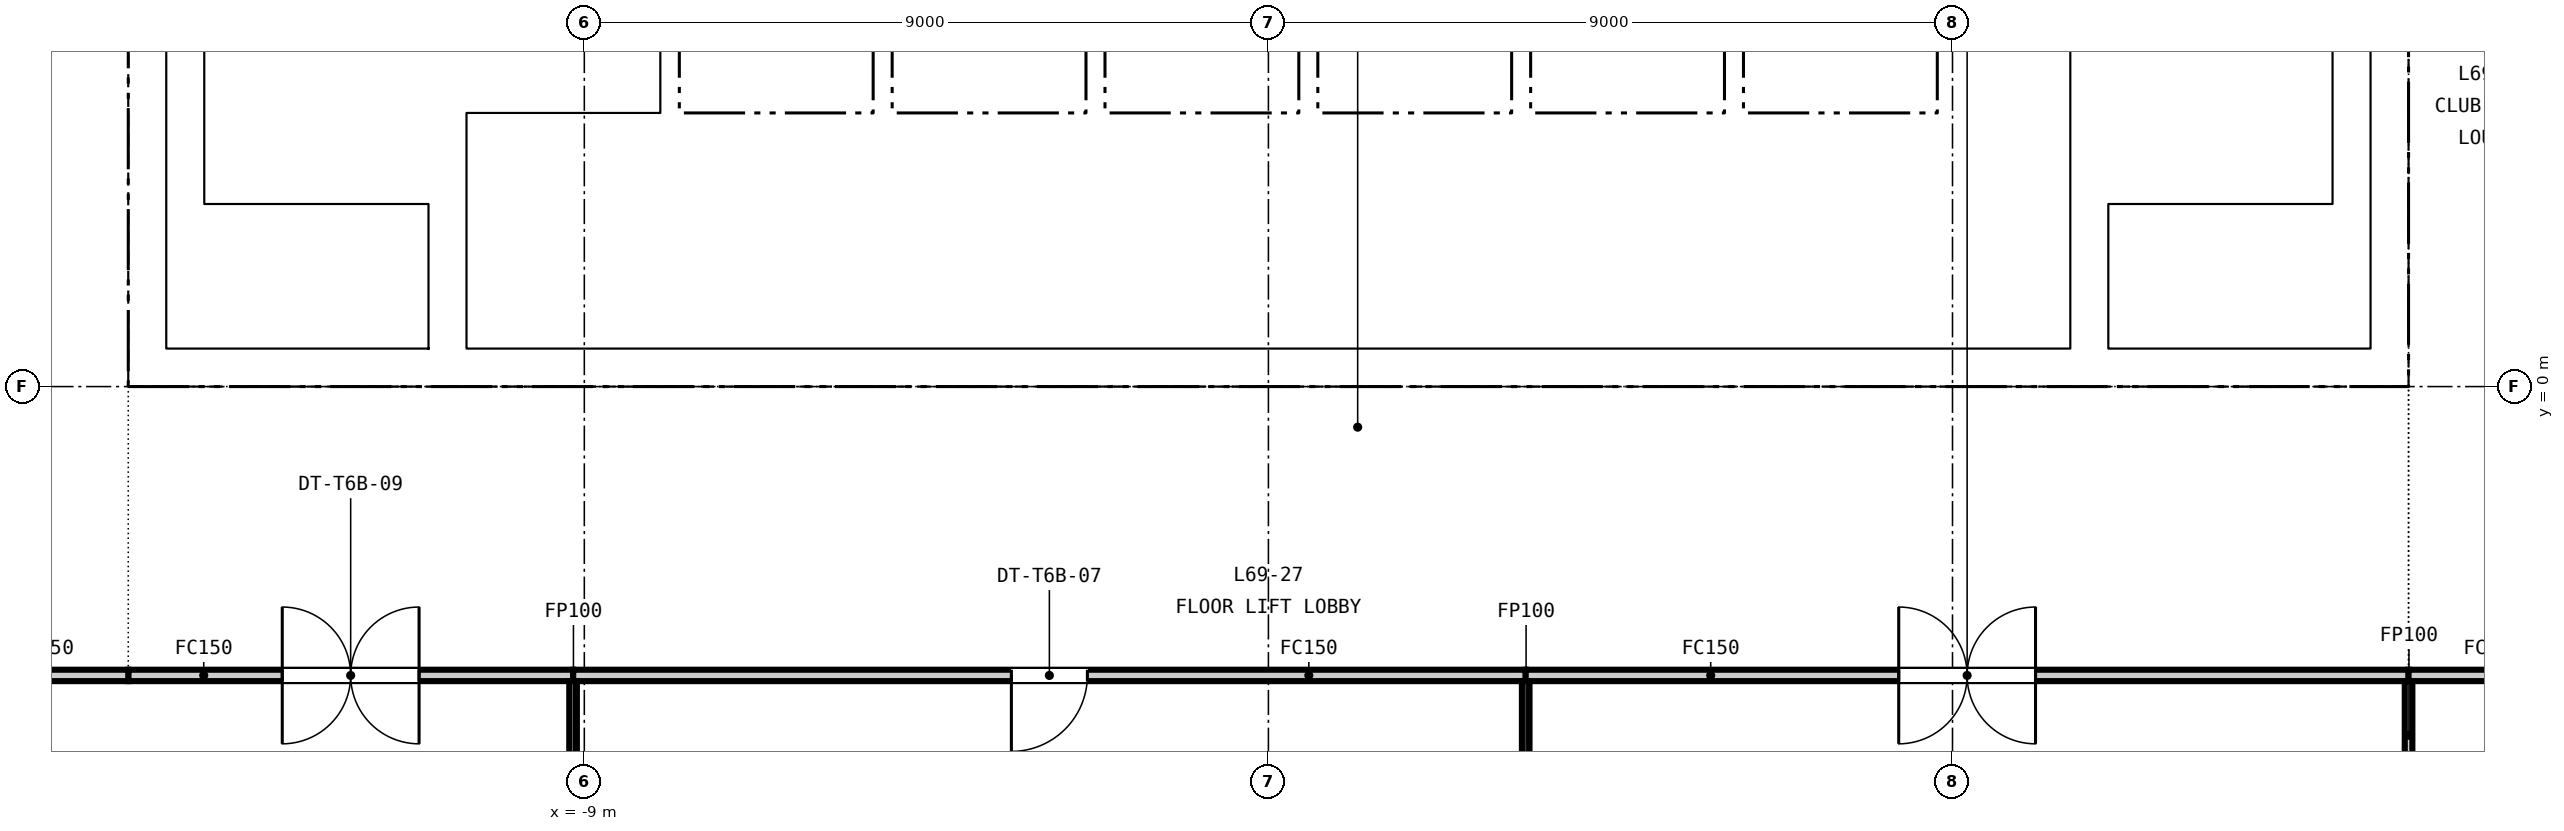
"""IFC4 building model, lengths in metres.
Left out: names, types, materials, properties, quantities, classifications, styles, units other than length and angle.
Written with IfcOpenShell. Run it as: python <this file> out.ifc"""

import sys

from ifc_helpers import new_model, si_unit, direction, frame, frame_2d, origin, place, context, subcontext, project, spatial, rectangle, extrude, element, fill, save


model = new_model("IFC4")
c1 = context("Model", 3, precision=1e-05, world=origin(), true_north=direction((0.0, 1.0)))
c2 = subcontext(c1, "Body", "Model", "MODEL_VIEW")
j1 = project(units=[si_unit("LENGTHUNIT", "METRE"), si_unit("PLANEANGLEUNIT", "RADIAN")], contexts=[c1])
p1 = place(None, origin())
s1 = spatial("IfcSite", under=j1, at=p1, CompositionType="ELEMENT")
p2 = place(p1, origin())
s2 = spatial("IfcBuilding", under=s1, at=p2, CompositionType="ELEMENT")
p3 = place(p2, frame((0.0, 0.0, 271.9)))
s3 = spatial("IfcBuildingStorey", under=s2, at=p3, CompositionType="ELEMENT", Elevation=271.9)
p4 = place(p3, frame((-15.0, 0.25, -0.15), z_axis=(0.0, 0.0, 1.0), x_axis=(1.0, 0.0, 0.0)))
e1 = element("IfcWall", 1, at=p4, inside=s3, PredefinedType="SOLIDWALL", context=c2, shape_type="SweptSolid", body=[
    extrude(rectangle(XDim=30.0, YDim=0.5, at=frame_2d((15.0, 0.0))), origin(), (0.0, 0.0, 1.0), 3.65),
])
p5 = place(p4, frame((5.8, 0.0, 0.15)))
e2 = element("IfcOpeningElement", 2, at=p5, cuts=e1, PredefinedType="OPENING", context=c2, shape_type="SweptSolid", body=[
    extrude(rectangle(XDim=2.4, YDim=2.4, at=frame_2d((1.2, 1.2))), frame((0.0, 0.26, 0.0), z_axis=(0.0, -1.0, 0.0), x_axis=(1.0, 0.0, 0.0)), (0.0, 0.0, 1.0), 0.52),
])
p6 = place(p4, frame((13.8, 0.0, 0.15)))
e3 = element("IfcOpeningElement", 3, at=p6, cuts=e1, PredefinedType="OPENING", context=c2, shape_type="SweptSolid", body=[
    extrude(rectangle(XDim=2.4, YDim=2.4, at=frame_2d((1.2, 1.2))), frame((0.0, 0.26, 0.0), z_axis=(0.0, -1.0, 0.0), x_axis=(1.0, 0.0, 0.0)), (0.0, 0.0, 1.0), 0.52),
])
p7 = place(p4, frame((21.8, 0.0, 0.15)))
e4 = element("IfcOpeningElement", 4, at=p7, cuts=e1, PredefinedType="OPENING", context=c2, shape_type="SweptSolid", body=[
    extrude(rectangle(XDim=2.4, YDim=2.4, at=frame_2d((1.2, 1.2))), frame((0.0, 0.26, 0.0), z_axis=(0.0, -1.0, 0.0), x_axis=(1.0, 0.0, 0.0)), (0.0, 0.0, 1.0), 0.52),
])
p8 = place(p4, frame((1.5, 0.0, 0.15)))
e5 = element("IfcOpeningElement", 5, at=p8, cuts=e1, PredefinedType="OPENING", context=c2, shape_type="SweptSolid", body=[
    extrude(rectangle(XDim=1.2, YDim=2.1, at=frame_2d((0.6, 1.05))), frame((0.0, 0.26, 0.0), z_axis=(0.0, -1.0, 0.0), x_axis=(1.0, 0.0, 0.0)), (0.0, 0.0, 1.0), 0.52),
])
p9 = place(p4, frame((27.3, 0.0, 0.15)))
e6 = element("IfcOpeningElement", 6, at=p9, cuts=e1, PredefinedType="OPENING", context=c2, shape_type="SweptSolid", body=[
    extrude(rectangle(XDim=1.2, YDim=2.1, at=frame_2d((0.6, 1.05))), frame((0.0, 0.26, 0.0), z_axis=(0.0, -1.0, 0.0), x_axis=(1.0, 0.0, 0.0)), (0.0, 0.0, 1.0), 0.52),
])
for number, where, z_axis, x_axis in (
    (7, (-14.75, 0.5, -0.15), (0.0, 0.0, 1.0), (0.0, 1.0, 0.0)),
    (8, (14.75, 0.5, -0.15), (0.0, 0.0, 1.0), (0.0, 1.0, 0.0)),
    (9, (-10.8, 0.5, -0.15), (0.0, 0.0, 1.0), (0.0, 1.0, 0.0)),
    (10, (10.8, 0.5, -0.15), (0.0, 0.0, 1.0), (0.0, 1.0, 0.0)),
):
    element("IfcWall", number, at=place(p3, frame(where, z_axis=z_axis, x_axis=x_axis)), inside=s3, PredefinedType="SOLIDWALL", context=c2, shape_type="SweptSolid", body=[
        extrude(rectangle(XDim=14.0, YDim=0.5, at=frame_2d((7.0, 0.0))), origin(), (0.0, 0.0, 1.0), 3.65),
    ])
p10 = place(p3, frame((-10.55, 3.5, 0.0), z_axis=(0.0, 0.0, 1.0), x_axis=(1.0, 0.0, 0.0)))
e11 = element("IfcWall", 11, at=p10, inside=s3, PredefinedType="PARTITIONING", context=c2, shape_type="SweptSolid", body=[
    extrude(rectangle(XDim=21.1, YDim=0.2, at=frame_2d((10.55, 0.0))), origin(), (0.0, 0.0, 1.0), 3.5),
])
p11 = place(p10, frame((0.675, 0.0, 0.0)))
e12 = element("IfcOpeningElement", 12, at=p11, cuts=e11, PredefinedType="OPENING", context=c2, shape_type="SweptSolid", body=[
    extrude(rectangle(XDim=1.2, YDim=2.1, at=frame_2d((0.6, 1.05))), frame((0.0, 0.11, 0.0), z_axis=(0.0, -1.0, 0.0), x_axis=(1.0, 0.0, 0.0)), (0.0, 0.0, 1.0), 0.22),
])
p12 = place(p10, frame((3.475, 0.0, 0.0)))
e13 = element("IfcOpeningElement", 13, at=p12, cuts=e11, PredefinedType="OPENING", context=c2, shape_type="SweptSolid", body=[
    extrude(rectangle(XDim=1.2, YDim=2.1, at=frame_2d((0.6, 1.05))), frame((0.0, 0.11, 0.0), z_axis=(0.0, -1.0, 0.0), x_axis=(1.0, 0.0, 0.0)), (0.0, 0.0, 1.0), 0.22),
])
p13 = place(p10, frame((6.275, 0.0, 0.0)))
e14 = element("IfcOpeningElement", 14, at=p13, cuts=e11, PredefinedType="OPENING", context=c2, shape_type="SweptSolid", body=[
    extrude(rectangle(XDim=1.2, YDim=2.1, at=frame_2d((0.6, 1.05))), frame((0.0, 0.11, 0.0), z_axis=(0.0, -1.0, 0.0), x_axis=(1.0, 0.0, 0.0)), (0.0, 0.0, 1.0), 0.22),
])
p14 = place(p10, frame((9.075, 0.0, 0.0)))
e15 = element("IfcOpeningElement", 15, at=p14, cuts=e11, PredefinedType="OPENING", context=c2, shape_type="SweptSolid", body=[
    extrude(rectangle(XDim=1.2, YDim=2.1, at=frame_2d((0.6, 1.05))), frame((0.0, 0.11, 0.0), z_axis=(0.0, -1.0, 0.0), x_axis=(1.0, 0.0, 0.0)), (0.0, 0.0, 1.0), 0.22),
])
p15 = place(p10, frame((11.875, 0.0, 0.0)))
e16 = element("IfcOpeningElement", 16, at=p15, cuts=e11, PredefinedType="OPENING", context=c2, shape_type="SweptSolid", body=[
    extrude(rectangle(XDim=1.2, YDim=2.1, at=frame_2d((0.6, 1.05))), frame((0.0, 0.11, 0.0), z_axis=(0.0, -1.0, 0.0), x_axis=(1.0, 0.0, 0.0)), (0.0, 0.0, 1.0), 0.22),
])
p16 = place(p10, frame((14.675, 0.0, 0.0)))
e17 = element("IfcOpeningElement", 17, at=p16, cuts=e11, PredefinedType="OPENING", context=c2, shape_type="SweptSolid", body=[
    extrude(rectangle(XDim=1.2, YDim=2.1, at=frame_2d((0.6, 1.05))), frame((0.0, 0.11, 0.0), z_axis=(0.0, -1.0, 0.0), x_axis=(1.0, 0.0, 0.0)), (0.0, 0.0, 1.0), 0.22),
])
p17 = place(p10, frame((17.475, 0.0, 0.0)))
e18 = element("IfcOpeningElement", 18, at=p17, cuts=e11, PredefinedType="OPENING", context=c2, shape_type="SweptSolid", body=[
    extrude(rectangle(XDim=1.2, YDim=2.1, at=frame_2d((0.6, 1.05))), frame((0.0, 0.11, 0.0), z_axis=(0.0, -1.0, 0.0), x_axis=(1.0, 0.0, 0.0)), (0.0, 0.0, 1.0), 0.22),
])
p18 = place(p10, frame((19.9, 0.0, 0.0)))
e19 = element("IfcOpeningElement", 19, at=p18, cuts=e11, PredefinedType="OPENING", context=c2, shape_type="SweptSolid", body=[
    extrude(rectangle(XDim=0.9, YDim=2.1, at=frame_2d((0.45, 1.05))), frame((0.0, 0.11, 0.0), z_axis=(0.0, -1.0, 0.0), x_axis=(1.0, 0.0, 0.0)), (0.0, 0.0, 1.0), 0.22),
])
for number, where, z_axis, x_axis in (
    (20, (-7.875, 3.6, 0.0), (0.0, 0.0, 1.0), (0.0, 1.0, 0.0)),
    (21, (-5.075, 3.6, 0.0), (0.0, 0.0, 1.0), (0.0, 1.0, 0.0)),
    (22, (-2.275, 3.6, 0.0), (0.0, 0.0, 1.0), (0.0, 1.0, 0.0)),
    (23, (0.525, 3.6, 0.0), (0.0, 0.0, 1.0), (0.0, 1.0, 0.0)),
    (24, (3.325, 3.6, 0.0), (0.0, 0.0, 1.0), (0.0, 1.0, 0.0)),
    (25, (6.125, 3.6, 0.0), (0.0, 0.0, 1.0), (0.0, 1.0, 0.0)),
    (26, (8.925, 3.6, 0.0), (0.0, 0.0, 1.0), (0.0, 1.0, 0.0)),
):
    element("IfcWall", number, at=place(p3, frame(where, z_axis=z_axis, x_axis=x_axis)), inside=s3, PredefinedType="PARTITIONING", context=c2, shape_type="SweptSolid", body=[
        extrude(rectangle(XDim=2.3, YDim=0.25, at=frame_2d((1.15, 0.0))), origin(), (0.0, 0.0, 1.0), 3.5),
    ])
for number, where, z_axis, x_axis in (
    (27, (-14.25, 0.5, 0.0), (0.0, 0.0, 1.0), (0.0, 1.0, 0.0)),
    (28, (14.25, 0.5, 0.0), (0.0, 0.0, 1.0), (0.0, 1.0, 0.0)),
):
    element("IfcWall", number, at=place(p3, frame(where, z_axis=z_axis, x_axis=x_axis)), inside=s3, PredefinedType="SOLIDWALL", context=c2, shape_type="SweptSolid", body=[
        extrude(rectangle(XDim=14.0, YDim=0.5, at=frame_2d((7.0, 0.0))), origin(), (0.0, 0.0, 1.0), 3.5),
    ])
p19 = place(p3, frame((3.385, -3.8, 0.0), z_axis=(0.0, 0.0, 1.0), x_axis=(-1.0, 0.0, 0.0)))
e29 = element("IfcWall", 29, at=p19, inside=s3, PredefinedType="PARTITIONING", context=c2, shape_type="SweptSolid", body=[
    extrude(rectangle(XDim=12.533, YDim=0.15, at=frame_2d((6.267, 0.0))), origin(), (0.0, 0.0, 1.0), 2.751),
])
p20 = place(p19, frame((5.767, 0.0, 0.0)))
e30 = element("IfcOpeningElement", 30, at=p20, cuts=e29, PredefinedType="OPENING", context=c2, shape_type="SweptSolid", body=[
    extrude(rectangle(XDim=1.0, YDim=2.1, at=frame_2d((0.5, 1.05))), frame((0.0, 0.085, 0.0), z_axis=(0.0, -1.0, 0.0), x_axis=(1.0, 0.0, 0.0)), (0.0, 0.0, 1.0), 0.17),
])
p21 = place(p3, frame((-9.148, -3.8, 0.0), z_axis=(0.0, 0.0, 1.0), x_axis=(-1.0, 0.0, 0.0)))
e31 = element("IfcWall", 31, at=p21, inside=s3, PredefinedType="PARTITIONING", context=c2, shape_type="SweptSolid", body=[
    extrude(rectangle(XDim=5.852, YDim=0.15, at=frame_2d((2.926, 0.0))), origin(), (0.0, 0.0, 1.0), 2.751),
])
p22 = place(p21, frame((2.026, 0.0, 0.0)))
e32 = element("IfcOpeningElement", 32, at=p22, cuts=e31, PredefinedType="OPENING", context=c2, shape_type="SweptSolid", body=[
    extrude(rectangle(XDim=1.8, YDim=2.1, at=frame_2d((0.9, 1.05))), frame((0.0, 0.085, 0.0), z_axis=(0.0, -1.0, 0.0), x_axis=(1.0, 0.0, 0.0)), (0.0, 0.0, 1.0), 0.17),
])
p23 = place(p3, frame((15.0, -3.8, 0.0), z_axis=(0.0, 0.0, 1.0), x_axis=(-1.0, 0.0, 0.0)))
e33 = element("IfcWall", 33, at=p23, inside=s3, PredefinedType="PARTITIONING", context=c2, shape_type="SweptSolid", body=[
    extrude(rectangle(XDim=11.615, YDim=0.15, at=frame_2d((5.808, 0.0))), origin(), (0.0, 0.0, 1.0), 2.751),
])
p24 = place(p23, frame((4.907, 0.0, 0.0)))
e34 = element("IfcOpeningElement", 34, at=p24, cuts=e33, PredefinedType="OPENING", context=c2, shape_type="SweptSolid", body=[
    extrude(rectangle(XDim=1.8, YDim=2.1, at=frame_2d((0.9, 1.05))), frame((0.0, 0.085, 0.0), z_axis=(0.0, -1.0, 0.0), x_axis=(1.0, 0.0, 0.0)), (0.0, 0.0, 1.0), 0.17),
])
for number, where, z_axis, x_axis in (
    (35, (-15.0, -3.8, 0.0), (0.0, 0.0, 1.0), (-1.0, 0.0, 0.0)),
    (36, (17.2, -3.8, 0.0), (0.0, 0.0, 1.0), (-1.0, 0.0, 0.0)),
):
    element("IfcWall", number, at=place(p3, frame(where, z_axis=z_axis, x_axis=x_axis)), inside=s3, PredefinedType="PARTITIONING", context=c2, shape_type="SweptSolid", body=[
        extrude(rectangle(XDim=2.2, YDim=0.15, at=frame_2d((1.1, 0.0))), origin(), (0.0, 0.0, 1.0), 2.751),
    ])
for number, where, z_axis, x_axis in (
    (37, (3.385, -8.85, 0.0), (0.0, 0.0, 1.0), (0.0, 1.0, 0.0)),
    (38, (-9.148, -8.85, 0.0), (0.0, 0.0, 1.0), (0.0, 1.0, 0.0)),
):
    element("IfcWall", number, at=place(p3, frame(where, z_axis=z_axis, x_axis=x_axis)), inside=s3, PredefinedType="PARTITIONING", context=c2, shape_type="SweptSolid", body=[
        extrude(rectangle(XDim=4.975, YDim=0.1, at=frame_2d((2.488, 0.0))), origin(), (0.0, 0.0, 1.0), 2.751),
    ])
p25 = place(p3, frame((15.0, -5.3, 0.0), z_axis=(0.0, 0.0, 1.0), x_axis=(0.0, 1.0, 0.0)))
e39 = element("IfcWall", 39, at=p25, inside=s3, PredefinedType="PARTITIONING", context=c2, shape_type="SweptSolid", body=[
    extrude(rectangle(XDim=1.425, YDim=0.1, at=frame_2d((0.712, 0.0))), origin(), (0.0, 0.0, 1.0), 2.751),
])
p26 = place(p11, origin())
e40 = element("IfcDoor", 40, at=p26, inside=s3, OperationType="DOUBLE_DOOR_SLIDING", PredefinedType="DOOR", context=c2, shape_type="SweptSolid", body=[
    extrude(rectangle(XDim=1.2, YDim=2.1, at=frame_2d((0.6, 1.05))), frame((0.0, 0.025, 0.0), z_axis=(0.0, -1.0, 0.0), x_axis=(1.0, 0.0, 0.0)), (0.0, 0.0, 1.0), 0.05),
])
fill(e12, e40)
p27 = place(p12, origin())
e41 = element("IfcDoor", 41, at=p27, inside=s3, OperationType="DOUBLE_DOOR_SLIDING", PredefinedType="DOOR", context=c2, shape_type="SweptSolid", body=[
    extrude(rectangle(XDim=1.2, YDim=2.1, at=frame_2d((0.6, 1.05))), frame((0.0, 0.025, 0.0), z_axis=(0.0, -1.0, 0.0), x_axis=(1.0, 0.0, 0.0)), (0.0, 0.0, 1.0), 0.05),
])
fill(e13, e41)
p28 = place(p13, origin())
e42 = element("IfcDoor", 42, at=p28, inside=s3, OperationType="DOUBLE_DOOR_SLIDING", PredefinedType="DOOR", context=c2, shape_type="SweptSolid", body=[
    extrude(rectangle(XDim=1.2, YDim=2.1, at=frame_2d((0.6, 1.05))), frame((0.0, 0.025, 0.0), z_axis=(0.0, -1.0, 0.0), x_axis=(1.0, 0.0, 0.0)), (0.0, 0.0, 1.0), 0.05),
])
fill(e14, e42)
p29 = place(p14, origin())
e43 = element("IfcDoor", 43, at=p29, inside=s3, OperationType="DOUBLE_DOOR_SLIDING", PredefinedType="DOOR", context=c2, shape_type="SweptSolid", body=[
    extrude(rectangle(XDim=1.2, YDim=2.1, at=frame_2d((0.6, 1.05))), frame((0.0, 0.025, 0.0), z_axis=(0.0, -1.0, 0.0), x_axis=(1.0, 0.0, 0.0)), (0.0, 0.0, 1.0), 0.05),
])
fill(e15, e43)
p30 = place(p15, origin())
e44 = element("IfcDoor", 44, at=p30, inside=s3, OperationType="DOUBLE_DOOR_SLIDING", PredefinedType="DOOR", context=c2, shape_type="SweptSolid", body=[
    extrude(rectangle(XDim=1.2, YDim=2.1, at=frame_2d((0.6, 1.05))), frame((0.0, 0.025, 0.0), z_axis=(0.0, -1.0, 0.0), x_axis=(1.0, 0.0, 0.0)), (0.0, 0.0, 1.0), 0.05),
])
fill(e16, e44)
p31 = place(p16, origin())
e45 = element("IfcDoor", 45, at=p31, inside=s3, OperationType="DOUBLE_DOOR_SLIDING", PredefinedType="DOOR", context=c2, shape_type="SweptSolid", body=[
    extrude(rectangle(XDim=1.2, YDim=2.1, at=frame_2d((0.6, 1.05))), frame((0.0, 0.025, 0.0), z_axis=(0.0, -1.0, 0.0), x_axis=(1.0, 0.0, 0.0)), (0.0, 0.0, 1.0), 0.05),
])
fill(e17, e45)
p32 = place(p17, origin())
e46 = element("IfcDoor", 46, at=p32, inside=s3, OperationType="DOUBLE_DOOR_SLIDING", PredefinedType="DOOR", context=c2, shape_type="SweptSolid", body=[
    extrude(rectangle(XDim=1.2, YDim=2.1, at=frame_2d((0.6, 1.05))), frame((0.0, 0.025, 0.0), z_axis=(0.0, -1.0, 0.0), x_axis=(1.0, 0.0, 0.0)), (0.0, 0.0, 1.0), 0.05),
])
fill(e18, e46)
p33 = place(p18, origin())
e47 = element("IfcDoor", 47, at=p33, inside=s3, OperationType="SINGLE_SWING_RIGHT", PredefinedType="DOOR", context=c2, shape_type="SweptSolid", body=[
    extrude(rectangle(XDim=0.9, YDim=2.1, at=frame_2d((0.45, 1.05))), frame((0.0, 0.025, 0.0), z_axis=(0.0, -1.0, 0.0), x_axis=(1.0, 0.0, 0.0)), (0.0, 0.0, 1.0), 0.05),
])
fill(e19, e47)
p34 = place(p5, origin())
e48 = element("IfcDoor", 48, at=p34, inside=s3, OperationType="DOUBLE_DOOR_DOUBLE_SWING", PredefinedType="DOOR", context=c2, shape_type="SweptSolid", body=[
    extrude(rectangle(XDim=2.4, YDim=2.4, at=frame_2d((1.2, 1.2))), frame((0.0, 0.025, 0.0), z_axis=(0.0, -1.0, 0.0), x_axis=(1.0, 0.0, 0.0)), (0.0, 0.0, 1.0), 0.05),
])
fill(e2, e48)
p35 = place(p6, origin())
e49 = element("IfcDoor", 49, at=p35, inside=s3, OperationType="DOUBLE_DOOR_DOUBLE_SWING", PredefinedType="DOOR", context=c2, shape_type="SweptSolid", body=[
    extrude(rectangle(XDim=2.4, YDim=2.4, at=frame_2d((1.2, 1.2))), frame((0.0, 0.025, 0.0), z_axis=(0.0, -1.0, 0.0), x_axis=(1.0, 0.0, 0.0)), (0.0, 0.0, 1.0), 0.05),
])
fill(e3, e49)
p36 = place(p7, origin())
e50 = element("IfcDoor", 50, at=p36, inside=s3, OperationType="DOUBLE_DOOR_DOUBLE_SWING", PredefinedType="DOOR", context=c2, shape_type="SweptSolid", body=[
    extrude(rectangle(XDim=2.4, YDim=2.4, at=frame_2d((1.2, 1.2))), frame((0.0, 0.025, 0.0), z_axis=(0.0, -1.0, 0.0), x_axis=(1.0, 0.0, 0.0)), (0.0, 0.0, 1.0), 0.05),
])
fill(e4, e50)
p37 = place(p8, origin())
e51 = element("IfcDoor", 51, at=p37, inside=s3, OperationType="SINGLE_SWING_LEFT", PredefinedType="DOOR", context=c2, shape_type="SweptSolid", body=[
    extrude(rectangle(XDim=1.2, YDim=2.1, at=frame_2d((0.6, 1.05))), frame((0.0, 0.025, 0.0), z_axis=(0.0, -1.0, 0.0), x_axis=(1.0, 0.0, 0.0)), (0.0, 0.0, 1.0), 0.05),
])
fill(e5, e51)
p38 = place(p9, origin())
e52 = element("IfcDoor", 52, at=p38, inside=s3, OperationType="SINGLE_SWING_RIGHT", PredefinedType="DOOR", context=c2, shape_type="SweptSolid", body=[
    extrude(rectangle(XDim=1.2, YDim=2.1, at=frame_2d((0.6, 1.05))), frame((0.0, 0.025, 0.0), z_axis=(0.0, -1.0, 0.0), x_axis=(1.0, 0.0, 0.0)), (0.0, 0.0, 1.0), 0.05),
])
fill(e6, e52)
p39 = place(p20, origin())
e53 = element("IfcDoor", 53, at=p39, inside=s3, OperationType="SINGLE_SWING_RIGHT", PredefinedType="DOOR", context=c2, shape_type="SweptSolid", body=[
    extrude(rectangle(XDim=1.0, YDim=2.1, at=frame_2d((0.5, 1.05))), frame((0.0, 0.025, 0.0), z_axis=(0.0, -1.0, 0.0), x_axis=(1.0, 0.0, 0.0)), (0.0, 0.0, 1.0), 0.05),
])
fill(e30, e53)
p40 = place(p22, origin())
e54 = element("IfcDoor", 54, at=p40, inside=s3, OperationType="DOUBLE_DOOR_DOUBLE_SWING", PredefinedType="DOOR", context=c2, shape_type="SweptSolid", body=[
    extrude(rectangle(XDim=1.8, YDim=2.1, at=frame_2d((0.9, 1.05))), frame((0.0, 0.025, 0.0), z_axis=(0.0, -1.0, 0.0), x_axis=(1.0, 0.0, 0.0)), (0.0, 0.0, 1.0), 0.05),
])
fill(e32, e54)
p41 = place(p24, origin())
e55 = element("IfcDoor", 55, at=p41, inside=s3, OperationType="DOUBLE_DOOR_DOUBLE_SWING", PredefinedType="DOOR", context=c2, shape_type="SweptSolid", body=[
    extrude(rectangle(XDim=1.8, YDim=2.1, at=frame_2d((0.9, 1.05))), frame((0.0, 0.025, 0.0), z_axis=(0.0, -1.0, 0.0), x_axis=(1.0, 0.0, 0.0)), (0.0, 0.0, 1.0), 0.05),
])
fill(e34, e55)
save(model, sys.argv[1])
